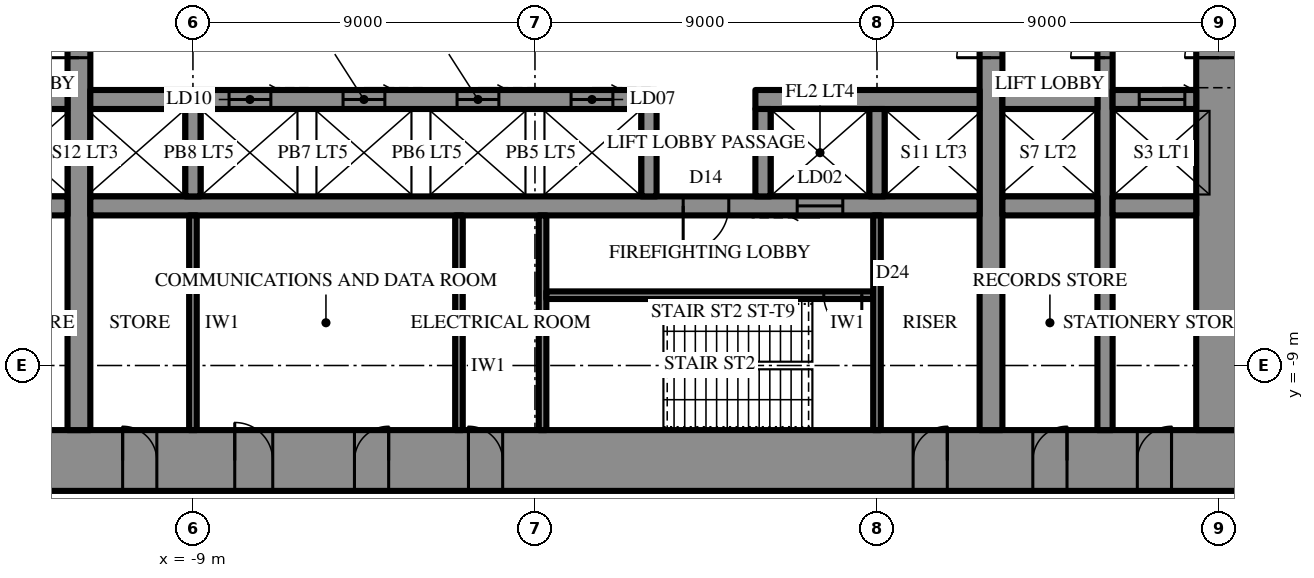
"""IFC4 building model, lengths in metres.
Left out: names, types, materials, properties, quantities, classifications, styles, units other than length and angle.
Written with IfcOpenShell. Run it as: python <this file> out.ifc"""

import sys

from ifc_helpers import new_model, si_unit, direction, frame, frame_2d, origin, place, context, subcontext, project, spatial, rectangle, extrude, element, fill, save


model = new_model("IFC4")
c1 = context("Model", 3, precision=1e-05, world=origin(), true_north=direction((0.0, 1.0)))
c2 = subcontext(c1, "Body", "Model", "MODEL_VIEW")
j1 = project(units=[si_unit("LENGTHUNIT", "METRE"), si_unit("PLANEANGLEUNIT", "RADIAN")], contexts=[c1])
p1 = place(None, origin())
s1 = spatial("IfcSite", under=j1, at=p1, CompositionType="ELEMENT")
p2 = place(p1, origin())
s2 = spatial("IfcBuilding", under=s1, at=p2, CompositionType="ELEMENT")
p3 = place(p2, frame((0.0, 0.0, 114.5)))
s3 = spatial("IfcBuildingStorey", under=s2, at=p3, CompositionType="ELEMENT", Elevation=114.5)
p4 = place(p3, frame((18.6, -11.5, 0.0), z_axis=(0.0, 0.0, 1.0), x_axis=(-1.0, 0.0, 0.0)))
e1 = element("IfcWall", 1, at=p4, inside=s3, PredefinedType="SHEAR", context=c2, shape_type="SweptSolid", body=[
    extrude(rectangle(XDim=37.2, YDim=1.6, at=frame_2d((18.6, 0.0))), origin(), (0.0, 0.0, 1.0), 5.0),
])
p5 = place(p4, frame((19.45, 0.0, 0.0)))
e2 = element("IfcOpeningElement", 2, at=p5, cuts=e1, PredefinedType="OPENING", context=c2, shape_type="SweptSolid", body=[
    extrude(rectangle(XDim=0.9, YDim=2.2, at=frame_2d((0.45, 1.1))), frame((0.0, 0.81, 0.0), z_axis=(0.0, -1.0, 0.0), x_axis=(1.0, 0.0, 0.0)), (0.0, 0.0, 1.0), 1.62),
])
p6 = place(p4, frame((22.45, 0.0, 0.0)))
e3 = element("IfcOpeningElement", 3, at=p6, cuts=e1, PredefinedType="OPENING", context=c2, shape_type="SweptSolid", body=[
    extrude(rectangle(XDim=0.9, YDim=2.2, at=frame_2d((0.45, 1.1))), frame((0.0, 0.81, 0.0), z_axis=(0.0, -1.0, 0.0), x_axis=(1.0, 0.0, 0.0)), (0.0, 0.0, 1.0), 1.62),
])
p7 = place(p4, frame((25.5, 0.0, 0.0)))
e4 = element("IfcOpeningElement", 4, at=p7, cuts=e1, PredefinedType="OPENING", context=c2, shape_type="SweptSolid", body=[
    extrude(rectangle(XDim=1.0, YDim=2.2, at=frame_2d((0.5, 1.1))), frame((0.0, 0.81, 0.0), z_axis=(0.0, -1.0, 0.0), x_axis=(1.0, 0.0, 0.0)), (0.0, 0.0, 1.0), 1.62),
])
p8 = place(p4, frame((1.85, 0.0, 0.0)))
e5 = element("IfcOpeningElement", 5, at=p8, cuts=e1, PredefinedType="OPENING", context=c2, shape_type="SweptSolid", body=[
    extrude(rectangle(XDim=0.9, YDim=2.2, at=frame_2d((0.45, 1.1))), frame((0.0, 0.81, 0.0), z_axis=(0.0, -1.0, 0.0), x_axis=(1.0, 0.0, 0.0)), (0.0, 0.0, 1.0), 1.62),
])
p9 = place(p4, frame((4.6, 0.0, 0.0)))
e6 = element("IfcOpeningElement", 6, at=p9, cuts=e1, PredefinedType="OPENING", context=c2, shape_type="SweptSolid", body=[
    extrude(rectangle(XDim=0.9, YDim=2.2, at=frame_2d((0.45, 1.1))), frame((0.0, 0.81, 0.0), z_axis=(0.0, -1.0, 0.0), x_axis=(1.0, 0.0, 0.0)), (0.0, 0.0, 1.0), 1.62),
])
p10 = place(p4, frame((7.75, 0.0, 0.0)))
e7 = element("IfcOpeningElement", 7, at=p10, cuts=e1, PredefinedType="OPENING", context=c2, shape_type="SweptSolid", body=[
    extrude(rectangle(XDim=0.9, YDim=2.2, at=frame_2d((0.45, 1.1))), frame((0.0, 0.81, 0.0), z_axis=(0.0, -1.0, 0.0), x_axis=(1.0, 0.0, 0.0)), (0.0, 0.0, 1.0), 1.62),
])
p11 = place(p4, frame((28.55, 0.0, 0.0)))
e8 = element("IfcOpeningElement", 8, at=p11, cuts=e1, PredefinedType="OPENING", context=c2, shape_type="SweptSolid", body=[
    extrude(rectangle(XDim=0.9, YDim=2.2, at=frame_2d((0.45, 1.1))), frame((0.0, 0.81, 0.0), z_axis=(0.0, -1.0, 0.0), x_axis=(1.0, 0.0, 0.0)), (0.0, 0.0, 1.0), 1.62),
])
p12 = place(p4, frame((31.7, 0.0, 0.0)))
e9 = element("IfcOpeningElement", 9, at=p12, cuts=e1, PredefinedType="OPENING", context=c2, shape_type="SweptSolid", body=[
    extrude(rectangle(XDim=0.9, YDim=2.2, at=frame_2d((0.45, 1.1))), frame((0.0, 0.81, 0.0), z_axis=(0.0, -1.0, 0.0), x_axis=(1.0, 0.0, 0.0)), (0.0, 0.0, 1.0), 1.62),
])
p13 = place(p4, frame((34.45, 0.0, 0.0)))
e10 = element("IfcOpeningElement", 10, at=p13, cuts=e1, PredefinedType="OPENING", context=c2, shape_type="SweptSolid", body=[
    extrude(rectangle(XDim=0.9, YDim=2.2, at=frame_2d((0.45, 1.1))), frame((0.0, 0.81, 0.0), z_axis=(0.0, -1.0, 0.0), x_axis=(1.0, 0.0, 0.0)), (0.0, 0.0, 1.0), 1.62),
])
p14 = place(p3, frame((18.0, -10.7, 0.0), z_axis=(0.0, 0.0, 1.0), x_axis=(0.0, 1.0, 0.0)))
e11 = element("IfcWall", 11, at=p14, inside=s3, PredefinedType="SHEAR", context=c2, shape_type="SweptSolid", body=[
    extrude(rectangle(XDim=21.4, YDim=1.2, at=frame_2d((10.7, 0.0))), origin(), (0.0, 0.0, 1.0), 5.0),
])
p15 = place(p14, frame((9.8, 0.0, 0.0)))
e12 = element("IfcOpeningElement", 12, at=p15, cuts=e11, PredefinedType="OPENING", context=c2, shape_type="SweptSolid", body=[
    extrude(rectangle(XDim=1.8, YDim=2.4, at=frame_2d((0.9, 1.2))), frame((0.0, 0.61, 0.0), z_axis=(0.0, -1.0, 0.0), x_axis=(1.0, 0.0, 0.0)), (0.0, 0.0, 1.0), 1.22),
])
p16 = place(p3, frame((12.0, -10.7, 0.0), z_axis=(0.0, 0.0, 1.0), x_axis=(0.0, 1.0, 0.0)))
e13 = element("IfcWall", 13, at=p16, inside=s3, PredefinedType="SHEAR", context=c2, shape_type="SweptSolid", body=[
    extrude(rectangle(XDim=21.4, YDim=0.6, at=frame_2d((10.7, 0.0))), origin(), (0.0, 0.0, 1.0), 5.0),
])
p17 = place(p16, frame((9.8, 0.0, 0.0)))
e14 = element("IfcOpeningElement", 14, at=p17, cuts=e13, PredefinedType="OPENING", context=c2, shape_type="SweptSolid", body=[
    extrude(rectangle(XDim=1.8, YDim=2.4, at=frame_2d((0.9, 1.2))), frame((0.0, 0.31, 0.0), z_axis=(0.0, -1.0, 0.0), x_axis=(1.0, 0.0, 0.0)), (0.0, 0.0, 1.0), 0.62),
])
p18 = place(p3, frame((-12.0, -10.7, 0.0), z_axis=(0.0, 0.0, 1.0), x_axis=(0.0, 1.0, 0.0)))
e15 = element("IfcWall", 15, at=p18, inside=s3, PredefinedType="SHEAR", context=c2, shape_type="SweptSolid", body=[
    extrude(rectangle(XDim=21.4, YDim=0.6, at=frame_2d((10.7, 0.0))), origin(), (0.0, 0.0, 1.0), 5.0),
])
p19 = place(p18, frame((9.8, 0.0, 0.0)))
e16 = element("IfcOpeningElement", 16, at=p19, cuts=e15, PredefinedType="OPENING", context=c2, shape_type="SweptSolid", body=[
    extrude(rectangle(XDim=1.8, YDim=2.4, at=frame_2d((0.9, 1.2))), frame((0.0, 0.31, 0.0), z_axis=(0.0, -1.0, 0.0), x_axis=(1.0, 0.0, 0.0)), (0.0, 0.0, 1.0), 0.62),
])
p20 = place(p3, frame((15.0, -10.7, 0.0), z_axis=(0.0, 0.0, 1.0), x_axis=(0.0, 1.0, 0.0)))
e17 = element("IfcWall", 17, at=p20, inside=s3, PredefinedType="SHEAR", context=c2, shape_type="SweptSolid", body=[
    extrude(rectangle(XDim=21.4, YDim=0.4, at=frame_2d((10.7, 0.0))), origin(), (0.0, 0.0, 1.0), 5.0),
])
p21 = place(p20, frame((9.8, 0.0, 0.0)))
e18 = element("IfcOpeningElement", 18, at=p21, cuts=e17, PredefinedType="OPENING", context=c2, shape_type="SweptSolid", body=[
    extrude(rectangle(XDim=1.8, YDim=2.4, at=frame_2d((0.9, 1.2))), frame((0.0, 0.21, 0.0), z_axis=(0.0, -1.0, 0.0), x_axis=(1.0, 0.0, 0.0)), (0.0, 0.0, 1.0), 0.42),
])
p22 = place(p3, frame((17.4, -2.0, 0.0), z_axis=(0.0, 0.0, 1.0), x_axis=(-1.0, 0.0, 0.0)))
e19 = element("IfcWall", 19, at=p22, inside=s3, PredefinedType="SHEAR", context=c2, shape_type="SweptSolid", body=[
    extrude(rectangle(XDim=2.2, YDim=0.5, at=frame_2d((1.1, 0.0))), origin(), (0.0, 0.0, 1.0), 5.0),
])
p23 = place(p22, frame((0.3, 0.0, 0.0)))
e20 = element("IfcOpeningElement", 20, at=p23, cuts=e19, PredefinedType="OPENING", context=c2, shape_type="SweptSolid", body=[
    extrude(rectangle(XDim=1.2, YDim=2.2, at=frame_2d((0.6, 1.1))), frame((0.0, 0.26, 0.0), z_axis=(0.0, -1.0, 0.0), x_axis=(1.0, 0.0, 0.0)), (0.0, 0.0, 1.0), 0.52),
])
p24 = place(p3, frame((14.8, -2.0, 0.0), z_axis=(0.0, 0.0, 1.0), x_axis=(-1.0, 0.0, 0.0)))
e21 = element("IfcWall", 21, at=p24, inside=s3, PredefinedType="SHEAR", context=c2, shape_type="SweptSolid", body=[
    extrude(rectangle(XDim=2.5, YDim=0.5, at=frame_2d((1.25, 0.0))), origin(), (0.0, 0.0, 1.0), 5.0),
])
p25 = place(p3, frame((11.7, -2.0, 0.0), z_axis=(0.0, 0.0, 1.0), x_axis=(-1.0, 0.0, 0.0)))
e22 = element("IfcWall", 22, at=p25, inside=s3, PredefinedType="SHEAR", context=c2, shape_type="SweptSolid", body=[
    extrude(rectangle(XDim=5.9, YDim=0.5, at=frame_2d((2.95, 0.0))), origin(), (0.0, 0.0, 1.0), 5.0),
])
p26 = place(p3, frame((3.2, -2.0, 0.0), z_axis=(0.0, 0.0, 1.0), x_axis=(-1.0, 0.0, 0.0)))
e23 = element("IfcWall", 23, at=p26, inside=s3, PredefinedType="SHEAR", context=c2, shape_type="SweptSolid", body=[
    extrude(rectangle(XDim=14.9, YDim=0.5, at=frame_2d((7.45, 0.0))), origin(), (0.0, 0.0, 1.0), 5.0),
])
p27 = place(p26, frame((1.15, 0.0, 0.0)))
e24 = element("IfcOpeningElement", 24, at=p27, cuts=e23, PredefinedType="OPENING", context=c2, shape_type="SweptSolid", body=[
    extrude(rectangle(XDim=1.1, YDim=2.2, at=frame_2d((0.55, 1.1))), frame((0.0, 0.26, 0.0), z_axis=(0.0, -1.0, 0.0), x_axis=(1.0, 0.0, 0.0)), (0.0, 0.0, 1.0), 0.52),
])
p28 = place(p26, frame((4.15, 0.0, 0.0)))
e25 = element("IfcOpeningElement", 25, at=p28, cuts=e23, PredefinedType="OPENING", context=c2, shape_type="SweptSolid", body=[
    extrude(rectangle(XDim=1.1, YDim=2.2, at=frame_2d((0.55, 1.1))), frame((0.0, 0.26, 0.0), z_axis=(0.0, -1.0, 0.0), x_axis=(1.0, 0.0, 0.0)), (0.0, 0.0, 1.0), 0.52),
])
p29 = place(p26, frame((7.15, 0.0, 0.0)))
e26 = element("IfcOpeningElement", 26, at=p29, cuts=e23, PredefinedType="OPENING", context=c2, shape_type="SweptSolid", body=[
    extrude(rectangle(XDim=1.1, YDim=2.2, at=frame_2d((0.55, 1.1))), frame((0.0, 0.26, 0.0), z_axis=(0.0, -1.0, 0.0), x_axis=(1.0, 0.0, 0.0)), (0.0, 0.0, 1.0), 0.52),
])
p30 = place(p26, frame((10.15, 0.0, 0.0)))
e27 = element("IfcOpeningElement", 27, at=p30, cuts=e23, PredefinedType="OPENING", context=c2, shape_type="SweptSolid", body=[
    extrude(rectangle(XDim=1.1, YDim=2.2, at=frame_2d((0.55, 1.1))), frame((0.0, 0.26, 0.0), z_axis=(0.0, -1.0, 0.0), x_axis=(1.0, 0.0, 0.0)), (0.0, 0.0, 1.0), 0.52),
])
p31 = place(p3, frame((-12.3, -2.0, 0.0), z_axis=(0.0, 0.0, 1.0), x_axis=(-1.0, 0.0, 0.0)))
e28 = element("IfcWall", 28, at=p31, inside=s3, PredefinedType="SHEAR", context=c2, shape_type="SweptSolid", body=[
    extrude(rectangle(XDim=2.5, YDim=0.5, at=frame_2d((1.25, 0.0))), origin(), (0.0, 0.0, 1.0), 5.0),
])
p32 = place(p3, frame((17.4, -4.8, 0.0), z_axis=(0.0, 0.0, 1.0), x_axis=(-1.0, 0.0, 0.0)))
e29 = element("IfcWall", 29, at=p32, inside=s3, PredefinedType="SHEAR", context=c2, shape_type="SweptSolid", body=[
    extrude(rectangle(XDim=2.2, YDim=0.5, at=frame_2d((1.1, 0.0))), origin(), (0.0, 0.0, 1.0), 5.0),
])
p33 = place(p3, frame((14.8, -4.8, 0.0), z_axis=(0.0, 0.0, 1.0), x_axis=(-1.0, 0.0, 0.0)))
e30 = element("IfcWall", 30, at=p33, inside=s3, PredefinedType="SHEAR", context=c2, shape_type="SweptSolid", body=[
    extrude(rectangle(XDim=2.5, YDim=0.5, at=frame_2d((1.25, 0.0))), origin(), (0.0, 0.0, 1.0), 5.0),
])
p34 = place(p3, frame((11.7, -4.8, 0.0), z_axis=(0.0, 0.0, 1.0), x_axis=(-1.0, 0.0, 0.0)))
e31 = element("IfcWall", 31, at=p34, inside=s3, PredefinedType="SHEAR", context=c2, shape_type="SweptSolid", body=[
    extrude(rectangle(XDim=23.4, YDim=0.5, at=frame_2d((11.7, 0.0))), origin(), (0.0, 0.0, 1.0), 5.0),
])
p35 = place(p34, frame((6.6, 0.0, 0.0)))
e32 = element("IfcOpeningElement", 32, at=p35, cuts=e31, PredefinedType="OPENING", context=c2, shape_type="SweptSolid", body=[
    extrude(rectangle(XDim=1.2, YDim=2.2, at=frame_2d((0.6, 1.1))), frame((0.0, 0.26, 0.0), z_axis=(0.0, -1.0, 0.0), x_axis=(1.0, 0.0, 0.0)), (0.0, 0.0, 1.0), 0.52),
])
p36 = place(p34, frame((3.6, 0.0, 0.0)))
e33 = element("IfcOpeningElement", 33, at=p36, cuts=e31, PredefinedType="OPENING", context=c2, shape_type="SweptSolid", body=[
    extrude(rectangle(XDim=1.2, YDim=2.2, at=frame_2d((0.6, 1.1))), frame((0.0, 0.26, 0.0), z_axis=(0.0, -1.0, 0.0), x_axis=(1.0, 0.0, 0.0)), (0.0, 0.0, 1.0), 0.52),
])
p37 = place(p3, frame((-12.3, -4.8, 0.0), z_axis=(0.0, 0.0, 1.0), x_axis=(-1.0, 0.0, 0.0)))
e34 = element("IfcWall", 34, at=p37, inside=s3, PredefinedType="SHEAR", context=c2, shape_type="SweptSolid", body=[
    extrude(rectangle(XDim=2.5, YDim=0.5, at=frame_2d((1.25, 0.0))), origin(), (0.0, 0.0, 1.0), 5.0),
])
for number, where, z_axis, x_axis in (
    (35, (9.0, -2.25, 0.0), (0.0, 0.0, 1.0), (0.0, -1.0, 0.0)),
    (36, (6.0, -2.25, 0.0), (0.0, 0.0, 1.0), (0.0, -1.0, 0.0)),
    (37, (3.0, -2.25, 0.0), (0.0, 0.0, 1.0), (0.0, -1.0, 0.0)),
    (38, (-9.0, -2.25, 0.0), (0.0, 0.0, 1.0), (0.0, -1.0, 0.0)),
):
    element("IfcWall", number, at=place(p3, frame(where, z_axis=z_axis, x_axis=x_axis)), inside=s3, PredefinedType="SHEAR", context=c2, shape_type="SweptSolid", body=[
        extrude(rectangle(XDim=2.3, YDim=0.4, at=frame_2d((1.15, 0.0))), origin(), (0.0, 0.0, 1.0), 5.0),
    ])
p38 = place(p3, frame((0.2, -5.05, 0.0), z_axis=(0.0, 0.0, 1.0), x_axis=(0.0, -1.0, 0.0)))
e39 = element("IfcWall", 39, at=p38, inside=s3, PredefinedType="SHEAR", context=c2, shape_type="SweptSolid", body=[
    extrude(rectangle(XDim=5.65, YDim=0.2, at=frame_2d((2.825, 0.0))), origin(), (0.0, 0.0, 1.0), 5.0),
])
p39 = place(p3, frame((8.9, -7.15, 0.0), z_axis=(0.0, 0.0, 1.0), x_axis=(-1.0, 0.0, 0.0)))
e40 = element("IfcWall", 40, at=p39, inside=s3, PredefinedType="SHEAR", context=c2, shape_type="SweptSolid", body=[
    extrude(rectangle(XDim=8.6, YDim=0.2, at=frame_2d((4.3, 0.0))), origin(), (0.0, 0.0, 1.0), 5.0),
])
p40 = place(p39, frame((0.3, 0.0, 0.0)))
e41 = element("IfcOpeningElement", 41, at=p40, cuts=e40, PredefinedType="OPENING", context=c2, shape_type="SweptSolid", body=[
    extrude(rectangle(XDim=1.0, YDim=2.2, at=frame_2d((0.5, 1.1))), frame((0.0, 0.11, 0.0), z_axis=(0.0, -1.0, 0.0), x_axis=(1.0, 0.0, 0.0)), (0.0, 0.0, 1.0), 0.22),
])
for number, where, z_axis, x_axis in (
    (42, (9.0, -5.05, 0.0), (0.0, 0.0, 1.0), (0.0, -1.0, 0.0)),
    (43, (-9.0, -5.05, 0.0), (0.0, 0.0, 1.0), (0.0, -1.0, 0.0)),
    (44, (-2.0, -5.05, 0.0), (0.0, 0.0, 1.0), (0.0, -1.0, 0.0)),
):
    element("IfcWall", number, at=place(p3, frame(where, z_axis=z_axis, x_axis=x_axis)), inside=s3, PredefinedType="PARTITIONING", context=c2, shape_type="SweptSolid", body=[
        extrude(rectangle(XDim=5.65, YDim=0.2, at=frame_2d((2.825, 0.0))), origin(), (0.0, 0.0, 1.0), 4.8),
    ])
p41 = place(p15, origin())
e45 = element("IfcDoor", 45, at=p41, inside=s3, OperationType="DOUBLE_DOOR_SINGLE_SWING", PredefinedType="DOOR", context=c2, shape_type="SweptSolid", body=[
    extrude(rectangle(XDim=1.8, YDim=2.4, at=frame_2d((0.9, 1.2))), frame((0.0, 0.025, 0.0), z_axis=(0.0, -1.0, 0.0), x_axis=(1.0, 0.0, 0.0)), (0.0, 0.0, 1.0), 0.05),
])
fill(e12, e45)
p42 = place(p35, origin())
e46 = element("IfcDoor", 46, at=p42, inside=s3, OperationType="SINGLE_SWING_LEFT", PredefinedType="DOOR", context=c2, shape_type="SweptSolid", body=[
    extrude(rectangle(XDim=1.2, YDim=2.2, at=frame_2d((0.6, 1.1))), frame((0.0, 0.025, 0.0), z_axis=(0.0, -1.0, 0.0), x_axis=(1.0, 0.0, 0.0)), (0.0, 0.0, 1.0), 0.05),
])
fill(e32, e46)
p43 = place(p40, origin())
e47 = element("IfcDoor", 47, at=p43, inside=s3, OperationType="SINGLE_SWING_RIGHT", PredefinedType="DOOR", context=c2, shape_type="SweptSolid", body=[
    extrude(rectangle(XDim=1.0, YDim=2.2, at=frame_2d((0.5, 1.1))), frame((0.0, 0.025, 0.0), z_axis=(0.0, -1.0, 0.0), x_axis=(1.0, 0.0, 0.0)), (0.0, 0.0, 1.0), 0.05),
])
fill(e41, e47)
p44 = place(p5, frame((0.9, 0.0, 0.0), z_axis=(0.0, 0.0, 1.0), x_axis=(-1.0, 0.0, 0.0)))
e48 = element("IfcDoor", 48, at=p44, inside=s3, OperationType="SINGLE_SWING_RIGHT", PredefinedType="DOOR", context=c2, shape_type="SweptSolid", body=[
    extrude(rectangle(XDim=0.9, YDim=2.2, at=frame_2d((0.45, 1.1))), frame((0.0, 0.025, 0.0), z_axis=(0.0, -1.0, 0.0), x_axis=(1.0, 0.0, 0.0)), (0.0, 0.0, 1.0), 0.05),
])
fill(e2, e48)
p45 = place(p6, frame((0.9, 0.0, 0.0), z_axis=(0.0, 0.0, 1.0), x_axis=(-1.0, 0.0, 0.0)))
e49 = element("IfcDoor", 49, at=p45, inside=s3, OperationType="SINGLE_SWING_LEFT", PredefinedType="DOOR", context=c2, shape_type="SweptSolid", body=[
    extrude(rectangle(XDim=0.9, YDim=2.2, at=frame_2d((0.45, 1.1))), frame((0.0, 0.025, 0.0), z_axis=(0.0, -1.0, 0.0), x_axis=(1.0, 0.0, 0.0)), (0.0, 0.0, 1.0), 0.05),
])
fill(e3, e49)
p46 = place(p7, frame((1.0, 0.0, 0.0), z_axis=(0.0, 0.0, 1.0), x_axis=(-1.0, 0.0, 0.0)))
e50 = element("IfcDoor", 50, at=p46, inside=s3, OperationType="SINGLE_SWING_RIGHT", PredefinedType="DOOR", context=c2, shape_type="SweptSolid", body=[
    extrude(rectangle(XDim=1.0, YDim=2.2, at=frame_2d((0.5, 1.1))), frame((0.0, 0.025, 0.0), z_axis=(0.0, -1.0, 0.0), x_axis=(1.0, 0.0, 0.0)), (0.0, 0.0, 1.0), 0.05),
])
fill(e4, e50)
p47 = place(p8, frame((0.9, 0.0, 0.0), z_axis=(0.0, 0.0, 1.0), x_axis=(-1.0, 0.0, 0.0)))
e51 = element("IfcDoor", 51, at=p47, inside=s3, OperationType="SINGLE_SWING_LEFT", PredefinedType="DOOR", context=c2, shape_type="SweptSolid", body=[
    extrude(rectangle(XDim=0.9, YDim=2.2, at=frame_2d((0.45, 1.1))), frame((0.0, 0.025, 0.0), z_axis=(0.0, -1.0, 0.0), x_axis=(1.0, 0.0, 0.0)), (0.0, 0.0, 1.0), 0.05),
])
fill(e5, e51)
p48 = place(p9, frame((0.9, 0.0, 0.0), z_axis=(0.0, 0.0, 1.0), x_axis=(-1.0, 0.0, 0.0)))
e52 = element("IfcDoor", 52, at=p48, inside=s3, OperationType="SINGLE_SWING_LEFT", PredefinedType="DOOR", context=c2, shape_type="SweptSolid", body=[
    extrude(rectangle(XDim=0.9, YDim=2.2, at=frame_2d((0.45, 1.1))), frame((0.0, 0.025, 0.0), z_axis=(0.0, -1.0, 0.0), x_axis=(1.0, 0.0, 0.0)), (0.0, 0.0, 1.0), 0.05),
])
fill(e6, e52)
p49 = place(p10, frame((0.9, 0.0, 0.0), z_axis=(0.0, 0.0, 1.0), x_axis=(-1.0, 0.0, 0.0)))
e53 = element("IfcDoor", 53, at=p49, inside=s3, OperationType="SINGLE_SWING_LEFT", PredefinedType="DOOR", context=c2, shape_type="SweptSolid", body=[
    extrude(rectangle(XDim=0.9, YDim=2.2, at=frame_2d((0.45, 1.1))), frame((0.0, 0.025, 0.0), z_axis=(0.0, -1.0, 0.0), x_axis=(1.0, 0.0, 0.0)), (0.0, 0.0, 1.0), 0.05),
])
fill(e7, e53)
p50 = place(p11, frame((0.9, 0.0, 0.0), z_axis=(0.0, 0.0, 1.0), x_axis=(-1.0, 0.0, 0.0)))
e54 = element("IfcDoor", 54, at=p50, inside=s3, OperationType="SINGLE_SWING_RIGHT", PredefinedType="DOOR", context=c2, shape_type="SweptSolid", body=[
    extrude(rectangle(XDim=0.9, YDim=2.2, at=frame_2d((0.45, 1.1))), frame((0.0, 0.025, 0.0), z_axis=(0.0, -1.0, 0.0), x_axis=(1.0, 0.0, 0.0)), (0.0, 0.0, 1.0), 0.05),
])
fill(e8, e54)
p51 = place(p17, origin())
e55 = element("IfcDoor", 55, at=p51, inside=s3, OperationType="DOUBLE_DOOR_SINGLE_SWING", PredefinedType="DOOR", context=c2, shape_type="SweptSolid", body=[
    extrude(rectangle(XDim=1.8, YDim=2.4, at=frame_2d((0.9, 1.2))), frame((0.0, 0.025, 0.0), z_axis=(0.0, -1.0, 0.0), x_axis=(1.0, 0.0, 0.0)), (0.0, 0.0, 1.0), 0.05),
])
fill(e14, e55)
p52 = place(p19, origin())
e56 = element("IfcDoor", 56, at=p52, inside=s3, OperationType="DOUBLE_DOOR_SINGLE_SWING", PredefinedType="DOOR", context=c2, shape_type="SweptSolid", body=[
    extrude(rectangle(XDim=1.8, YDim=2.4, at=frame_2d((0.9, 1.2))), frame((0.0, 0.025, 0.0), z_axis=(0.0, -1.0, 0.0), x_axis=(1.0, 0.0, 0.0)), (0.0, 0.0, 1.0), 0.05),
])
fill(e16, e56)
p53 = place(p21, origin())
e57 = element("IfcDoor", 57, at=p53, inside=s3, OperationType="DOUBLE_DOOR_SINGLE_SWING", PredefinedType="DOOR", context=c2, shape_type="SweptSolid", body=[
    extrude(rectangle(XDim=1.8, YDim=2.4, at=frame_2d((0.9, 1.2))), frame((0.0, 0.025, 0.0), z_axis=(0.0, -1.0, 0.0), x_axis=(1.0, 0.0, 0.0)), (0.0, 0.0, 1.0), 0.05),
])
fill(e18, e57)
p54 = place(p23, frame((1.2, 0.0, 0.0), z_axis=(0.0, 0.0, 1.0), x_axis=(-1.0, 0.0, 0.0)))
e58 = element("IfcDoor", 58, at=p54, inside=s3, OperationType="SLIDING_TO_LEFT", PredefinedType="DOOR", context=c2, shape_type="SweptSolid", body=[
    extrude(rectangle(XDim=1.2, YDim=2.2, at=frame_2d((0.6, 1.1))), frame((0.0, 0.025, 0.0), z_axis=(0.0, -1.0, 0.0), x_axis=(1.0, 0.0, 0.0)), (0.0, 0.0, 1.0), 0.05),
])
fill(e20, e58)
p55 = place(p36, origin())
e59 = element("IfcDoor", 59, at=p55, inside=s3, OperationType="SLIDING_TO_LEFT", PredefinedType="DOOR", context=c2, shape_type="SweptSolid", body=[
    extrude(rectangle(XDim=1.2, YDim=2.2, at=frame_2d((0.6, 1.1))), frame((0.0, 0.025, 0.0), z_axis=(0.0, -1.0, 0.0), x_axis=(1.0, 0.0, 0.0)), (0.0, 0.0, 1.0), 0.05),
])
fill(e33, e59)
p56 = place(p27, frame((1.1, 0.0, 0.0), z_axis=(0.0, 0.0, 1.0), x_axis=(-1.0, 0.0, 0.0)))
e60 = element("IfcDoor", 60, at=p56, inside=s3, OperationType="SLIDING_TO_LEFT", PredefinedType="DOOR", context=c2, shape_type="SweptSolid", body=[
    extrude(rectangle(XDim=1.1, YDim=2.2, at=frame_2d((0.55, 1.1))), frame((0.0, 0.025, 0.0), z_axis=(0.0, -1.0, 0.0), x_axis=(1.0, 0.0, 0.0)), (0.0, 0.0, 1.0), 0.05),
])
fill(e24, e60)
p57 = place(p28, frame((1.1, 0.0, 0.0), z_axis=(0.0, 0.0, 1.0), x_axis=(-1.0, 0.0, 0.0)))
e61 = element("IfcDoor", 61, at=p57, inside=s3, OperationType="SLIDING_TO_LEFT", PredefinedType="DOOR", context=c2, shape_type="SweptSolid", body=[
    extrude(rectangle(XDim=1.1, YDim=2.2, at=frame_2d((0.55, 1.1))), frame((0.0, 0.025, 0.0), z_axis=(0.0, -1.0, 0.0), x_axis=(1.0, 0.0, 0.0)), (0.0, 0.0, 1.0), 0.05),
])
fill(e25, e61)
p58 = place(p29, frame((1.1, 0.0, 0.0), z_axis=(0.0, 0.0, 1.0), x_axis=(-1.0, 0.0, 0.0)))
e62 = element("IfcDoor", 62, at=p58, inside=s3, OperationType="SLIDING_TO_LEFT", PredefinedType="DOOR", context=c2, shape_type="SweptSolid", body=[
    extrude(rectangle(XDim=1.1, YDim=2.2, at=frame_2d((0.55, 1.1))), frame((0.0, 0.025, 0.0), z_axis=(0.0, -1.0, 0.0), x_axis=(1.0, 0.0, 0.0)), (0.0, 0.0, 1.0), 0.05),
])
fill(e26, e62)
p59 = place(p30, frame((1.1, 0.0, 0.0), z_axis=(0.0, 0.0, 1.0), x_axis=(-1.0, 0.0, 0.0)))
e63 = element("IfcDoor", 63, at=p59, inside=s3, OperationType="SLIDING_TO_LEFT", PredefinedType="DOOR", context=c2, shape_type="SweptSolid", body=[
    extrude(rectangle(XDim=1.1, YDim=2.2, at=frame_2d((0.55, 1.1))), frame((0.0, 0.025, 0.0), z_axis=(0.0, -1.0, 0.0), x_axis=(1.0, 0.0, 0.0)), (0.0, 0.0, 1.0), 0.05),
])
fill(e27, e63)
save(model, sys.argv[1])
